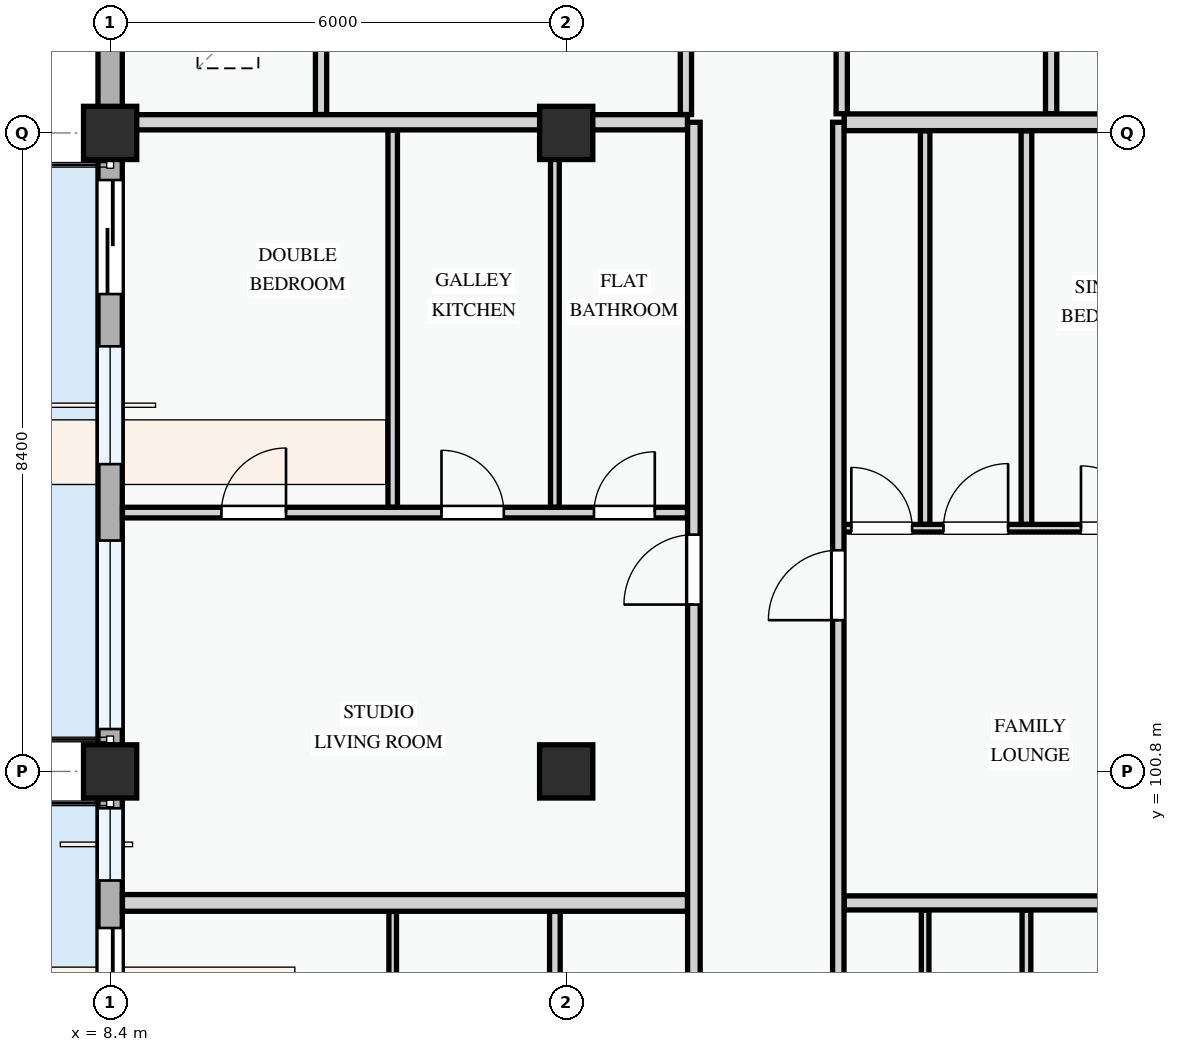
"""IFC4 building model, lengths in metres.
Left out: names, types, materials, properties, quantities, classifications, styles, units other than length and angle.
Written with IfcOpenShell. Run it as: python <this file> out.ifc"""

import sys

from ifc_helpers import new_model, si_unit, direction, frame, frame_2d, origin, origin_2d, place, context, subcontext, project, spatial, rectangle, extrude, element, fill, save


model = new_model("IFC4")
c1 = context("Model", 3, precision=1e-05, world=origin(), true_north=direction((0.0, 1.0)))
c2 = subcontext(c1, "Body", "Model", "MODEL_VIEW")
j1 = project(units=[si_unit("LENGTHUNIT", "METRE"), si_unit("PLANEANGLEUNIT", "RADIAN")], contexts=[c1])
p1 = place(None, origin())
s1 = spatial("IfcSite", under=j1, at=p1, CompositionType="ELEMENT")
p2 = place(p1, origin())
s2 = spatial("IfcBuilding", under=s1, at=p2, CompositionType="ELEMENT")
p3 = place(p2, frame((0.0, 0.0, 21.3)))
s3 = spatial("IfcBuildingStorey", under=s2, at=p3, CompositionType="ELEMENT", Elevation=21.3)
for number, where, z_axis, x_axis in (
    (1, (8.4, 100.8, 0.0), (0.0, 0.0, 1.0), (1.0, 0.0, 0.0)),
    (2, (8.4, 109.2, 0.0), (0.0, 0.0, 1.0), (1.0, 0.0, 0.0)),
    (3, (14.4, 100.8, 0.0), (0.0, 0.0, 1.0), (1.0, 0.0, 0.0)),
    (4, (14.4, 109.2, 0.0), (0.0, 0.0, 1.0), (1.0, 0.0, 0.0)),
):
    element("IfcColumn", number, at=place(p3, frame(where, z_axis=z_axis, x_axis=x_axis)), inside=s3, PredefinedType="COLUMN", context=c2, shape_type="SweptSolid", body=[
        extrude(rectangle(XDim=0.7, YDim=0.7, at=origin_2d()), origin(), (0.0, 0.0, 1.0), 3.3),
    ])
p4 = place(p3, frame((8.4, 115.2, 0.0), z_axis=(0.0, 0.0, 1.0), x_axis=(0.0, -1.0, 0.0)))
e5 = element("IfcWall", 5, at=p4, inside=s3, PredefinedType="STANDARD", context=c2, shape_type="SweptSolid", body=[
    extrude(rectangle(XDim=6.0, YDim=0.32, at=frame_2d((3.0, 0.0))), origin(), (0.0, 0.0, 1.0), 2.445),
])
p5 = place(p4, frame((0.52, 0.0, 0.78)))
e6 = element("IfcOpeningElement", 6, at=p5, cuts=e5, PredefinedType="OPENING", context=c2, shape_type="SweptSolid", body=[
    extrude(rectangle(XDim=0.95, YDim=1.15, at=frame_2d((0.475, 0.575))), frame((0.0, 0.17, 0.0), z_axis=(0.0, -1.0, 0.0), x_axis=(1.0, 0.0, 0.0)), (0.0, 0.0, 1.0), 0.34),
])
p6 = place(p4, frame((2.815, 0.0, 0.78)))
e7 = element("IfcOpeningElement", 7, at=p6, cuts=e5, PredefinedType="OPENING", context=c2, shape_type="SweptSolid", body=[
    extrude(rectangle(XDim=1.98, YDim=1.5, at=frame_2d((0.99, 0.75))), frame((0.0, 0.17, 0.0), z_axis=(0.0, -1.0, 0.0), x_axis=(1.0, 0.0, 0.0)), (0.0, 0.0, 1.0), 0.34),
])
p7 = place(p3, frame((8.4, 109.2, 0.0), z_axis=(0.0, 0.0, 1.0), x_axis=(0.0, -1.0, 0.0)))
e8 = element("IfcWall", 8, at=p7, inside=s3, PredefinedType="STANDARD", context=c2, shape_type="SweptSolid", body=[
    extrude(rectangle(XDim=8.4, YDim=0.32, at=frame_2d((4.2, 0.0))), origin(), (0.0, 0.0, 1.0), 2.345),
])
p8 = place(p7, frame((0.62, 0.0, 0.0)))
e9 = element("IfcOpeningElement", 9, at=p8, cuts=e8, PredefinedType="OPENING", context=c2, shape_type="SweptSolid", body=[
    extrude(rectangle(XDim=1.5, YDim=2.2, at=frame_2d((0.75, 1.1))), frame((0.0, 0.17, 0.0), z_axis=(0.0, -1.0, 0.0), x_axis=(1.0, 0.0, 0.0)), (0.0, 0.0, 1.0), 0.34),
])
p9 = place(p7, frame((2.808, 0.0, 0.78)))
e10 = element("IfcOpeningElement", 10, at=p9, cuts=e8, PredefinedType="OPENING", context=c2, shape_type="SweptSolid", body=[
    extrude(rectangle(XDim=1.55, YDim=1.4, at=frame_2d((0.775, 0.7))), frame((0.0, 0.17, 0.0), z_axis=(0.0, -1.0, 0.0), x_axis=(1.0, 0.0, 0.0)), (0.0, 0.0, 1.0), 0.34),
])
p10 = place(p7, frame((5.363, 0.0, 0.78)))
e11 = element("IfcOpeningElement", 11, at=p10, cuts=e8, PredefinedType="OPENING", context=c2, shape_type="SweptSolid", body=[
    extrude(rectangle(XDim=2.48, YDim=1.46, at=frame_2d((1.24, 0.73))), frame((0.0, 0.17, 0.0), z_axis=(0.0, -1.0, 0.0), x_axis=(1.0, 0.0, 0.0)), (0.0, 0.0, 1.0), 0.34),
])
p11 = place(p3, frame((8.4, 100.8, 0.0), z_axis=(0.0, 0.0, 1.0), x_axis=(0.0, -1.0, 0.0)))
e12 = element("IfcWall", 12, at=p11, inside=s3, PredefinedType="STANDARD", context=c2, shape_type="SweptSolid", body=[
    extrude(rectangle(XDim=6.0, YDim=0.32, at=frame_2d((3.0, 0.0))), origin(), (0.0, 0.0, 1.0), 2.445),
])
p12 = place(p11, frame((2.06, 0.0, 0.0)))
e13 = element("IfcOpeningElement", 13, at=p12, cuts=e12, PredefinedType="OPENING", context=c2, shape_type="SweptSolid", body=[
    extrude(rectangle(XDim=1.6, YDim=2.2, at=frame_2d((0.8, 1.1))), frame((0.0, 0.17, 0.0), z_axis=(0.0, -1.0, 0.0), x_axis=(1.0, 0.0, 0.0)), (0.0, 0.0, 1.0), 0.34),
])
p13 = place(p11, frame((0.485, 0.0, 0.78)))
e14 = element("IfcOpeningElement", 14, at=p13, cuts=e12, PredefinedType="OPENING", context=c2, shape_type="SweptSolid", body=[
    extrude(rectangle(XDim=0.95, YDim=1.15, at=frame_2d((0.475, 0.575))), frame((0.0, 0.17, 0.0), z_axis=(0.0, -1.0, 0.0), x_axis=(1.0, 0.0, 0.0)), (0.0, 0.0, 1.0), 0.34),
])
p14 = place(p11, frame((4.26, 0.0, 0.78)))
e15 = element("IfcOpeningElement", 15, at=p14, cuts=e12, PredefinedType="OPENING", context=c2, shape_type="SweptSolid", body=[
    extrude(rectangle(XDim=1.0, YDim=1.25, at=frame_2d((0.5, 0.625))), frame((0.0, 0.17, 0.0), z_axis=(0.0, -1.0, 0.0), x_axis=(1.0, 0.0, 0.0)), (0.0, 0.0, 1.0), 0.34),
])
for number, where, z_axis, x_axis in (
    (16, (11.175, 113.324, 0.0), (0.0, 0.0, 1.0), (0.0, -1.0, 0.0)),
    (17, (15.975, 113.324, 0.0), (0.0, 0.0, 1.0), (0.0, -1.0, 0.0)),
):
    element("IfcWall", number, at=place(p3, frame(where, z_axis=z_axis, x_axis=x_axis)), inside=s3, PredefinedType="PARTITIONING", context=c2, shape_type="SweptSolid", body=[
        extrude(rectangle(XDim=3.882, YDim=0.148, at=frame_2d((1.941, 0.0))), origin(), (0.0, 0.0, 1.0), 3.0),
    ])
for number, where, z_axis, x_axis in (
    (18, (18.025, 113.324, 0.0), (0.0, 0.0, 1.0), (0.0, -1.0, 0.0)),
    (19, (20.78, 113.324, 0.0), (0.0, 0.0, 1.0), (0.0, -1.0, 0.0)),
):
    element("IfcWall", number, at=place(p3, frame(where, z_axis=z_axis, x_axis=x_axis)), inside=s3, PredefinedType="PARTITIONING", context=c2, shape_type="SweptSolid", body=[
        extrude(rectangle(XDim=3.872, YDim=0.148, at=frame_2d((1.936, 0.0))), origin(), (0.0, 0.0, 1.0), 3.0),
    ])
p15 = place(p3, frame((12.118, 92.824, 0.0), z_axis=(0.0, 0.0, 1.0), x_axis=(0.0, 1.0, 0.0)))
e20 = element("IfcWall", 20, at=p15, inside=s3, PredefinedType="PARTITIONING", context=c2, shape_type="SweptSolid", body=[
    extrude(rectangle(XDim=6.134, YDim=0.1, at=frame_2d((3.067, 0.0))), origin(), (0.0, 0.0, 1.0), 3.0),
])
p16 = place(p3, frame((14.251, 92.824, 0.0), z_axis=(0.0, 0.0, 1.0), x_axis=(0.0, 1.0, 0.0)))
e21 = element("IfcWall", 21, at=p16, inside=s3, PredefinedType="PARTITIONING", context=c2, shape_type="SweptSolid", body=[
    extrude(rectangle(XDim=6.134, YDim=0.14, at=frame_2d((3.067, 0.0))), origin(), (0.0, 0.0, 1.0), 2.425),
])
p17 = place(p3, frame((20.455, 92.577, 0.0), z_axis=(0.0, 0.0, 1.0), x_axis=(0.0, 1.0, 0.0)))
e22 = element("IfcWall", 22, at=p17, inside=s3, PredefinedType="PARTITIONING", context=c2, shape_type="SweptSolid", body=[
    extrude(rectangle(XDim=6.398, YDim=0.115, at=frame_2d((3.199, 0.0))), origin(), (0.0, 0.0, 1.0), 3.0),
])
p18 = place(p3, frame((19.122, 92.577, 0.0), z_axis=(0.0, 0.0, 1.0), x_axis=(0.0, 1.0, 0.0)))
e23 = element("IfcWall", 23, at=p18, inside=s3, PredefinedType="PARTITIONING", context=c2, shape_type="SweptSolid", body=[
    extrude(rectangle(XDim=6.398, YDim=0.1, at=frame_2d((3.199, 0.0))), origin(), (0.0, 0.0, 1.0), 3.0),
])
p19 = place(p3, frame((8.562, 104.205, 0.0), z_axis=(0.0, 0.0, 1.0), x_axis=(1.0, 0.0, 0.0)))
e24 = element("IfcWall", 24, at=p19, inside=s3, PredefinedType="PARTITIONING", context=c2, shape_type="SweptSolid", body=[
    extrude(rectangle(XDim=7.434, YDim=0.14, at=frame_2d((3.717, 0.0))), origin(), (0.0, 0.0, 1.0), 3.0),
])
p20 = place(p19, frame((1.302, 0.0, 0.0)))
e25 = element("IfcOpeningElement", 25, at=p20, cuts=e24, PredefinedType="OPENING", context=c2, shape_type="SweptSolid", body=[
    extrude(rectangle(XDim=0.85, YDim=2.1, at=frame_2d((0.425, 1.05))), frame((0.0, 0.08, 0.0), z_axis=(0.0, -1.0, 0.0), x_axis=(1.0, 0.0, 0.0)), (0.0, 0.0, 1.0), 0.16),
])
p21 = place(p19, frame((4.198, 0.0, 0.0)))
e26 = element("IfcOpeningElement", 26, at=p21, cuts=e24, PredefinedType="OPENING", context=c2, shape_type="SweptSolid", body=[
    extrude(rectangle(XDim=0.82, YDim=2.08, at=frame_2d((0.41, 1.04))), frame((0.0, 0.08, 0.0), z_axis=(0.0, -1.0, 0.0), x_axis=(1.0, 0.0, 0.0)), (0.0, 0.0, 1.0), 0.16),
])
p22 = place(p19, frame((6.204, 0.0, 0.0)))
e27 = element("IfcOpeningElement", 27, at=p22, cuts=e24, PredefinedType="OPENING", context=c2, shape_type="SweptSolid", body=[
    extrude(rectangle(XDim=0.8, YDim=2.1, at=frame_2d((0.4, 1.05))), frame((0.0, 0.08, 0.0), z_axis=(0.0, -1.0, 0.0), x_axis=(1.0, 0.0, 0.0)), (0.0, 0.0, 1.0), 0.16),
])
p23 = place(p3, frame((12.118, 104.277, 0.0), z_axis=(0.0, 0.0, 1.0), x_axis=(0.0, 1.0, 0.0)))
e28 = element("IfcWall", 28, at=p23, inside=s3, PredefinedType="PARTITIONING", context=c2, shape_type="SweptSolid", body=[
    extrude(rectangle(XDim=4.961, YDim=0.125, at=frame_2d((2.48, 0.0))), origin(), (0.0, 0.0, 1.0), 3.0),
])
p24 = place(p3, frame((14.251, 104.277, 0.0), z_axis=(0.0, 0.0, 1.0), x_axis=(0.0, 1.0, 0.0)))
e29 = element("IfcWall", 29, at=p24, inside=s3, PredefinedType="PARTITIONING", context=c2, shape_type="SweptSolid", body=[
    extrude(rectangle(XDim=4.961, YDim=0.115, at=frame_2d((2.48, 0.0))), origin(), (0.0, 0.0, 1.0), 2.425),
])
p25 = place(p3, frame((17.98, 104.0, 0.0), z_axis=(0.0, 0.0, 1.0), x_axis=(1.0, 0.0, 0.0)))
e30 = element("IfcWall", 30, at=p25, inside=s3, PredefinedType="PARTITIONING", context=c2, shape_type="SweptSolid", body=[
    extrude(rectangle(XDim=4.658, YDim=0.1, at=frame_2d((2.329, 0.0))), origin(), (0.0, 0.0, 1.0), 3.0),
])
p26 = place(p25, frame((0.171, 0.0, 0.0)))
e31 = element("IfcOpeningElement", 31, at=p26, cuts=e30, PredefinedType="OPENING", context=c2, shape_type="SweptSolid", body=[
    extrude(rectangle(XDim=0.8, YDim=2.1, at=frame_2d((0.4, 1.05))), frame((0.0, 0.06, 0.0), z_axis=(0.0, -1.0, 0.0), x_axis=(1.0, 0.0, 0.0)), (0.0, 0.0, 1.0), 0.12),
])
p27 = place(p25, frame((1.384, 0.0, 0.0)))
e32 = element("IfcOpeningElement", 32, at=p27, cuts=e30, PredefinedType="OPENING", context=c2, shape_type="SweptSolid", body=[
    extrude(rectangle(XDim=0.85, YDim=2.1, at=frame_2d((0.425, 1.05))), frame((0.0, 0.06, 0.0), z_axis=(0.0, -1.0, 0.0), x_axis=(1.0, 0.0, 0.0)), (0.0, 0.0, 1.0), 0.12),
])
p28 = place(p25, frame((3.193, 0.0, 0.0)))
e33 = element("IfcOpeningElement", 33, at=p28, cuts=e30, PredefinedType="OPENING", context=c2, shape_type="SweptSolid", body=[
    extrude(rectangle(XDim=0.82, YDim=2.08, at=frame_2d((0.41, 1.04))), frame((0.0, 0.06, 0.0), z_axis=(0.0, -1.0, 0.0), x_axis=(1.0, 0.0, 0.0)), (0.0, 0.0, 1.0), 0.12),
])
p29 = place(p3, frame((20.455, 104.052, 0.0), z_axis=(0.0, 0.0, 1.0), x_axis=(0.0, 1.0, 0.0)))
e34 = element("IfcWall", 34, at=p29, inside=s3, PredefinedType="PARTITIONING", context=c2, shape_type="SweptSolid", body=[
    extrude(rectangle(XDim=5.177, YDim=0.14, at=frame_2d((2.588, 0.0))), origin(), (0.0, 0.0, 1.0), 3.0),
])
p30 = place(p3, frame((19.122, 104.052, 0.0), z_axis=(0.0, 0.0, 1.0), x_axis=(0.0, 1.0, 0.0)))
e35 = element("IfcWall", 35, at=p30, inside=s3, PredefinedType="PARTITIONING", context=c2, shape_type="SweptSolid", body=[
    extrude(rectangle(XDim=5.177, YDim=0.125, at=frame_2d((2.588, 0.0))), origin(), (0.0, 0.0, 1.0), 3.0),
])
p31 = place(p3, frame((8.562, 99.07, 0.0), z_axis=(0.0, 0.0, 1.0), x_axis=(1.0, 0.0, 0.0)))
e36 = element("IfcWall", 36, at=p31, inside=s3, PredefinedType="PARTITIONING", context=c2, shape_type="SweptSolid", body=[
    extrude(rectangle(XDim=7.434, YDim=0.22, at=frame_2d((3.717, 0.0))), origin(), (0.0, 0.0, 1.0), 3.0),
])
p32 = place(p3, frame((18.057, 99.07, 0.0), z_axis=(0.0, 0.0, 1.0), x_axis=(1.0, 0.0, 0.0)))
e37 = element("IfcWall", 37, at=p32, inside=s3, PredefinedType="PARTITIONING", context=c2, shape_type="SweptSolid", body=[
    extrude(rectangle(XDim=4.581, YDim=0.185, at=frame_2d((2.291, 0.0))), origin(), (0.0, 0.0, 1.0), 3.0),
])
p33 = place(p3, frame((8.562, 109.34, 0.0), z_axis=(0.0, 0.0, 1.0), x_axis=(1.0, 0.0, 0.0)))
e38 = element("IfcWall", 38, at=p33, inside=s3, PredefinedType="PARTITIONING", context=c2, shape_type="SweptSolid", body=[
    extrude(rectangle(XDim=7.434, YDim=0.2, at=frame_2d((3.717, 0.0))), origin(), (0.0, 0.0, 1.0), 2.375),
])
p34 = place(p3, frame((18.057, 109.34, 0.0), z_axis=(0.0, 0.0, 1.0), x_axis=(1.0, 0.0, 0.0)))
e39 = element("IfcWall", 39, at=p34, inside=s3, PredefinedType="PARTITIONING", context=c2, shape_type="SweptSolid", body=[
    extrude(rectangle(XDim=4.683, YDim=0.22, at=frame_2d((2.342, 0.0))), origin(), (0.0, 0.0, 1.0), 2.375),
])
p35 = place(p3, frame((16.08, 86.562, 0.0), z_axis=(0.0, 0.0, 1.0), x_axis=(0.0, 1.0, 0.0)))
e40 = element("IfcWall", 40, at=p35, inside=s3, PredefinedType="PARTITIONING", context=c2, shape_type="SweptSolid", body=[
    extrude(rectangle(XDim=22.778, YDim=0.165, at=frame_2d((11.389, 0.0))), origin(), (0.0, 0.0, 1.0), 3.0),
])
p36 = place(p35, frame((3.63, 0.0, 0.0)))
e41 = element("IfcOpeningElement", 41, at=p36, cuts=e40, PredefinedType="OPENING", context=c2, shape_type="SweptSolid", body=[
    extrude(rectangle(XDim=0.92, YDim=2.1, at=frame_2d((0.46, 1.05))), frame((0.0, 0.093, 0.0), z_axis=(0.0, -1.0, 0.0), x_axis=(1.0, 0.0, 0.0)), (0.0, 0.0, 1.0), 0.185),
])
p37 = place(p35, frame((16.433, 0.0, 0.0)))
e42 = element("IfcOpeningElement", 42, at=p37, cuts=e40, PredefinedType="OPENING", context=c2, shape_type="SweptSolid", body=[
    extrude(rectangle(XDim=0.92, YDim=2.1, at=frame_2d((0.46, 1.05))), frame((0.0, 0.093, 0.0), z_axis=(0.0, -1.0, 0.0), x_axis=(1.0, 0.0, 0.0)), (0.0, 0.0, 1.0), 0.185),
])
p38 = place(p3, frame((17.98, 86.562, 0.0), z_axis=(0.0, 0.0, 1.0), x_axis=(0.0, 1.0, 0.0)))
e43 = element("IfcWall", 43, at=p38, inside=s3, PredefinedType="PARTITIONING", context=c2, shape_type="SweptSolid", body=[
    extrude(rectangle(XDim=22.778, YDim=0.15, at=frame_2d((11.389, 0.0))), origin(), (0.0, 0.0, 1.0), 3.0),
])
p39 = place(p38, frame((3.593, 0.0, 0.0)))
e44 = element("IfcOpeningElement", 44, at=p39, cuts=e43, PredefinedType="OPENING", context=c2, shape_type="SweptSolid", body=[
    extrude(rectangle(XDim=0.92, YDim=2.1, at=frame_2d((0.46, 1.05))), frame((0.0, 0.085, 0.0), z_axis=(0.0, -1.0, 0.0), x_axis=(1.0, 0.0, 0.0)), (0.0, 0.0, 1.0), 0.17),
])
p40 = place(p38, frame((16.228, 0.0, 0.0)))
e45 = element("IfcOpeningElement", 45, at=p40, cuts=e43, PredefinedType="OPENING", context=c2, shape_type="SweptSolid", body=[
    extrude(rectangle(XDim=0.92, YDim=2.1, at=frame_2d((0.46, 1.05))), frame((0.0, 0.085, 0.0), z_axis=(0.0, -1.0, 0.0), x_axis=(1.0, 0.0, 0.0)), (0.0, 0.0, 1.0), 0.17),
])
p41 = place(p8, frame((1.5, 0.0, 0.0), z_axis=(0.0, 0.0, 1.0), x_axis=(-1.0, 0.0, 0.0)))
e46 = element("IfcDoor", 46, at=p41, inside=s3, OperationType="SLIDING_TO_RIGHT", PredefinedType="DOOR", context=c2, shape_type="SweptSolid", body=[
    extrude(rectangle(XDim=1.5, YDim=2.2, at=frame_2d((0.75, 1.1))), frame((0.0, 0.025, 0.0), z_axis=(0.0, -1.0, 0.0), x_axis=(1.0, 0.0, 0.0)), (0.0, 0.0, 1.0), 0.05),
])
fill(e9, e46)
p42 = place(p9, origin())
e47 = element("IfcWindow", 47, at=p42, inside=s3, PartitioningType="SINGLE_PANEL", PredefinedType="WINDOW", context=c2, shape_type="SweptSolid", body=[
    extrude(rectangle(XDim=1.55, YDim=1.4, at=frame_2d((0.775, 0.7))), frame((0.0, 0.03, 0.0), z_axis=(0.0, -1.0, 0.0), x_axis=(1.0, 0.0, 0.0)), (0.0, 0.0, 1.0), 0.06),
])
fill(e10, e47)
p43 = place(p10, origin())
e48 = element("IfcWindow", 48, at=p43, inside=s3, PartitioningType="DOUBLE_PANEL_VERTICAL", PredefinedType="WINDOW", context=c2, shape_type="SweptSolid", body=[
    extrude(rectangle(XDim=2.48, YDim=1.46, at=frame_2d((1.24, 0.73))), frame((0.0, 0.03, 0.0), z_axis=(0.0, -1.0, 0.0), x_axis=(1.0, 0.0, 0.0)), (0.0, 0.0, 1.0), 0.06),
])
fill(e11, e48)
p44 = place(p12, frame((1.6, 0.0, 0.0), z_axis=(0.0, 0.0, 1.0), x_axis=(-1.0, 0.0, 0.0)))
e49 = element("IfcDoor", 49, at=p44, inside=s3, OperationType="SLIDING_TO_LEFT", PredefinedType="DOOR", context=c2, shape_type="SweptSolid", body=[
    extrude(rectangle(XDim=1.6, YDim=2.2, at=frame_2d((0.8, 1.1))), frame((0.0, 0.025, 0.0), z_axis=(0.0, -1.0, 0.0), x_axis=(1.0, 0.0, 0.0)), (0.0, 0.0, 1.0), 0.05),
])
fill(e13, e49)
p45 = place(p13, origin())
e50 = element("IfcWindow", 50, at=p45, inside=s3, PartitioningType="SINGLE_PANEL", PredefinedType="WINDOW", context=c2, shape_type="SweptSolid", body=[
    extrude(rectangle(XDim=0.95, YDim=1.15, at=frame_2d((0.475, 0.575))), frame((0.0, 0.03, 0.0), z_axis=(0.0, -1.0, 0.0), x_axis=(1.0, 0.0, 0.0)), (0.0, 0.0, 1.0), 0.06),
])
fill(e14, e50)
p46 = place(p20, origin())
e51 = element("IfcDoor", 51, at=p46, inside=s3, OperationType="SINGLE_SWING_RIGHT", PredefinedType="DOOR", context=c2, shape_type="SweptSolid", body=[
    extrude(rectangle(XDim=0.85, YDim=2.1, at=frame_2d((0.425, 1.05))), frame((0.0, 0.025, 0.0), z_axis=(0.0, -1.0, 0.0), x_axis=(1.0, 0.0, 0.0)), (0.0, 0.0, 1.0), 0.05),
])
fill(e25, e51)
p47 = place(p21, origin())
e52 = element("IfcDoor", 52, at=p47, inside=s3, OperationType="SINGLE_SWING_LEFT", PredefinedType="DOOR", context=c2, shape_type="SweptSolid", body=[
    extrude(rectangle(XDim=0.82, YDim=2.08, at=frame_2d((0.41, 1.04))), frame((0.0, 0.025, 0.0), z_axis=(0.0, -1.0, 0.0), x_axis=(1.0, 0.0, 0.0)), (0.0, 0.0, 1.0), 0.05),
])
fill(e26, e52)
p48 = place(p22, origin())
e53 = element("IfcDoor", 53, at=p48, inside=s3, OperationType="SINGLE_SWING_RIGHT", PredefinedType="DOOR", context=c2, shape_type="SweptSolid", body=[
    extrude(rectangle(XDim=0.8, YDim=2.1, at=frame_2d((0.4, 1.05))), frame((0.0, 0.025, 0.0), z_axis=(0.0, -1.0, 0.0), x_axis=(1.0, 0.0, 0.0)), (0.0, 0.0, 1.0), 0.05),
])
fill(e27, e53)
p49 = place(p26, origin())
e54 = element("IfcDoor", 54, at=p49, inside=s3, OperationType="SINGLE_SWING_LEFT", PredefinedType="DOOR", context=c2, shape_type="SweptSolid", body=[
    extrude(rectangle(XDim=0.8, YDim=2.1, at=frame_2d((0.4, 1.05))), frame((0.0, 0.025, 0.0), z_axis=(0.0, -1.0, 0.0), x_axis=(1.0, 0.0, 0.0)), (0.0, 0.0, 1.0), 0.05),
])
fill(e31, e54)
p50 = place(p27, origin())
e55 = element("IfcDoor", 55, at=p50, inside=s3, OperationType="SINGLE_SWING_RIGHT", PredefinedType="DOOR", context=c2, shape_type="SweptSolid", body=[
    extrude(rectangle(XDim=0.85, YDim=2.1, at=frame_2d((0.425, 1.05))), frame((0.0, 0.025, 0.0), z_axis=(0.0, -1.0, 0.0), x_axis=(1.0, 0.0, 0.0)), (0.0, 0.0, 1.0), 0.05),
])
fill(e32, e55)
p51 = place(p28, origin())
e56 = element("IfcDoor", 56, at=p51, inside=s3, OperationType="SINGLE_SWING_LEFT", PredefinedType="DOOR", context=c2, shape_type="SweptSolid", body=[
    extrude(rectangle(XDim=0.82, YDim=2.08, at=frame_2d((0.41, 1.04))), frame((0.0, 0.025, 0.0), z_axis=(0.0, -1.0, 0.0), x_axis=(1.0, 0.0, 0.0)), (0.0, 0.0, 1.0), 0.05),
])
fill(e33, e56)
p52 = place(p37, origin())
e57 = element("IfcDoor", 57, at=p52, inside=s3, OperationType="SINGLE_SWING_LEFT", PredefinedType="DOOR", context=c2, shape_type="SweptSolid", body=[
    extrude(rectangle(XDim=0.92, YDim=2.1, at=frame_2d((0.46, 1.05))), frame((0.0, 0.025, 0.0), z_axis=(0.0, -1.0, 0.0), x_axis=(1.0, 0.0, 0.0)), (0.0, 0.0, 1.0), 0.05),
])
fill(e42, e57)
p53 = place(p40, origin())
e58 = element("IfcDoor", 58, at=p53, inside=s3, OperationType="SINGLE_SWING_LEFT", PredefinedType="DOOR", context=c2, shape_type="SweptSolid", body=[
    extrude(rectangle(XDim=0.92, YDim=2.1, at=frame_2d((0.46, 1.05))), frame((0.0, 0.025, 0.0), z_axis=(0.0, -1.0, 0.0), x_axis=(1.0, 0.0, 0.0)), (0.0, 0.0, 1.0), 0.05),
])
fill(e45, e58)
save(model, sys.argv[1])
